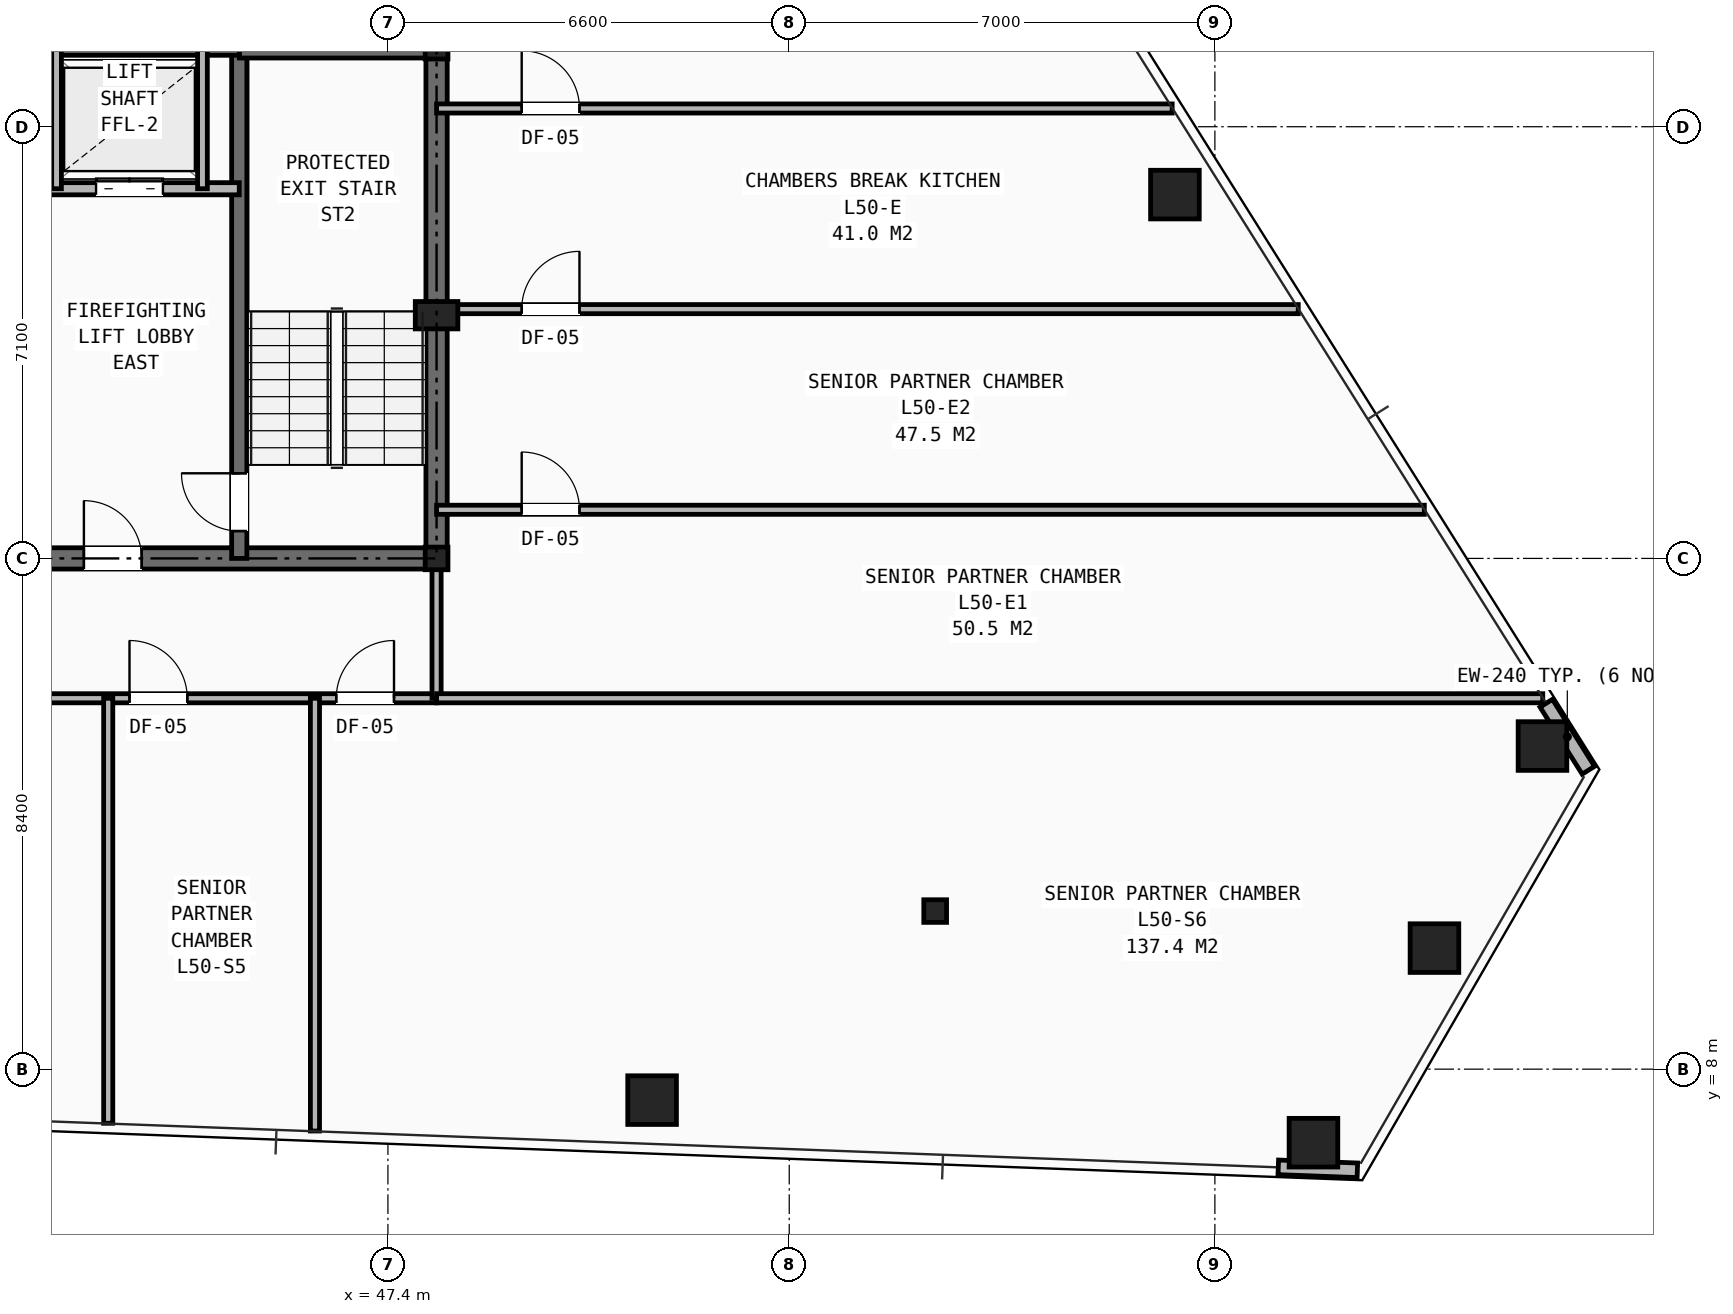
"""IFC4 building model, lengths in metres.
Left out: names, types, materials, properties, quantities, classifications, styles, units other than length and angle.
Written with IfcOpenShell. Run it as: python <this file> out.ifc"""

import sys

from ifc_helpers import new_model, si_unit, direction, frame, frame_2d, origin, origin_2d, place, context, subcontext, project, spatial, rectangle, hollow_rectangle, i_section, extrude, element, fill, save


model = new_model("IFC4")
c1 = context("Model", 3, precision=1e-05, world=origin(), true_north=direction((0.0, 1.0)))
c2 = subcontext(c1, "Body", "Model", "MODEL_VIEW")
j1 = project(units=[si_unit("LENGTHUNIT", "METRE"), si_unit("PLANEANGLEUNIT", "RADIAN")], contexts=[c1])
p1 = place(None, origin())
s1 = spatial("IfcSite", under=j1, at=p1, CompositionType="ELEMENT")
p2 = place(p1, origin())
s2 = spatial("IfcBuilding", under=s1, at=p2, CompositionType="ELEMENT")
p3 = place(p2, frame((0.0, 0.0, 175.8)))
s3 = spatial("IfcBuildingStorey", under=s2, at=p3, CompositionType="ELEMENT", Elevation=175.8)
for number, where, z_axis, x_axis in (
    (1, (48.2, 16.4, 0.0), (0.0, 0.0, 1.0), (1.0, 0.0, 0.0)),
    (2, (48.2, 24.8, 0.0), (0.0, 0.0, 1.0), (1.0, 0.0, 0.0)),
    (3, (56.4, 10.6, 0.0), (0.0, 0.0, 1.0), (1.0, 0.0, 0.0)),
):
    element("IfcColumn", number, at=place(p3, frame(where, z_axis=z_axis, x_axis=x_axis)), inside=s3, PredefinedType="COLUMN", context=c2, shape_type="SweptSolid", body=[
        extrude(i_section(OverallWidth=0.374, OverallDepth=0.372, WebThickness=0.016, FlangeThickness=0.026, at=origin_2d()), origin(), (0.0, 0.0, 1.0), 3.45),
    ])
p4 = place(p3, frame((48.2, 20.4, 0.0), z_axis=(0.0, 0.0, 1.0), x_axis=(1.0, 0.0, 0.0)))
e4 = element("IfcColumn", 4, at=p4, inside=s3, PredefinedType="PILASTER", context=c2, shape_type="SweptSolid", body=[
    extrude(rectangle(XDim=0.7, YDim=0.45, at=origin_2d()), origin(), (0.0, 0.0, 1.0), 3.45),
])
for number, where, z_axis, x_axis in (
    (5, (51.744, 7.491, 0.0), (0.0, 0.0, 1.0), (1.0, 0.0, 0.0)),
    (6, (62.621, 6.791, 0.0), (0.0, 0.0, 1.0), (1.0, 0.0, 0.0)),
    (7, (64.611, 9.991, 0.0), (0.0, 0.0, 1.0), (1.0, 0.0, 0.0)),
    (8, (66.388, 13.314, 0.0), (0.0, 0.0, 1.0), (1.0, 0.0, 0.0)),
    (9, (60.343, 22.384, 0.0), (0.0, 0.0, 1.0), (1.0, 0.0, 0.0)),
):
    element("IfcColumn", number, at=place(p3, frame(where, z_axis=z_axis, x_axis=x_axis)), inside=s3, PredefinedType="COLUMN", context=c2, shape_type="SweptSolid", body=[
        extrude(hollow_rectangle(XDim=0.8, YDim=0.8, WallThickness=0.055, at=origin_2d()), origin(), (0.0, 0.0, 1.0), 3.45),
    ])
for number, where, z_axis, x_axis in (
    (10, (62.042, 6.385, 0.0), (0.0, 0.0, 1.0), (0.999, -0.037, 0.0)),
    (11, (67.142, 12.916, 0.0), (0.0, 0.0, 1.0), (-0.532, 0.847, 0.0)),
):
    element("IfcWall", number, at=place(p3, frame(where, z_axis=z_axis, x_axis=x_axis)), inside=s3, PredefinedType="SHEAR", context=c2, shape_type="SweptSolid", body=[
        extrude(rectangle(XDim=1.302, YDim=0.24, at=frame_2d((0.651, 0.0))), origin(), (0.0, 0.0, 1.0), 2.583),
    ])
p5 = place(p3, frame((31.8, 16.4, 0.0), z_axis=(0.0, 0.0, 1.0), x_axis=(1.0, 0.0, 0.0)))
e12 = element("IfcWall", 12, at=p5, inside=s3, PredefinedType="SHEAR", context=c2, shape_type="SweptSolid", body=[
    extrude(rectangle(XDim=16.4, YDim=0.35, at=frame_2d((8.2, 0.0))), origin(), (0.0, 0.0, 1.0), 3.21),
])
p6 = place(p5, frame((7.75, 0.0, 0.0)))
e13 = element("IfcOpeningElement", 13, at=p6, cuts=e12, PredefinedType="OPENING", context=c2, shape_type="SweptSolid", body=[
    extrude(rectangle(XDim=0.9, YDim=2.1, at=frame_2d((0.45, 1.05))), frame((0.0, 0.185, 0.0), z_axis=(0.0, -1.0, 0.0), x_axis=(1.0, 0.0, 0.0)), (0.0, 0.0, 1.0), 0.37),
])
p7 = place(p5, frame((4.2, 0.0, 0.0)))
e14 = element("IfcOpeningElement", 14, at=p7, cuts=e12, PredefinedType="OPENING", context=c2, shape_type="SweptSolid", body=[
    extrude(rectangle(XDim=0.95, YDim=2.1, at=frame_2d((0.475, 1.05))), frame((0.0, 0.185, 0.0), z_axis=(0.0, -1.0, 0.0), x_axis=(1.0, 0.0, 0.0)), (0.0, 0.0, 1.0), 0.37),
])
p8 = place(p5, frame((10.6, 0.0, 0.0)))
e15 = element("IfcOpeningElement", 15, at=p8, cuts=e12, PredefinedType="OPENING", context=c2, shape_type="SweptSolid", body=[
    extrude(rectangle(XDim=0.95, YDim=2.1, at=frame_2d((0.475, 1.05))), frame((0.0, 0.185, 0.0), z_axis=(0.0, -1.0, 0.0), x_axis=(1.0, 0.0, 0.0)), (0.0, 0.0, 1.0), 0.37),
])
p9 = place(p3, frame((48.2, 16.4, 0.0), z_axis=(0.0, 0.0, 1.0), x_axis=(0.0, 1.0, 0.0)))
e16 = element("IfcWall", 16, at=p9, inside=s3, PredefinedType="SHEAR", context=c2, shape_type="SweptSolid", body=[
    extrude(rectangle(XDim=14.8, YDim=0.35, at=frame_2d((7.4, 0.0))), origin(), (0.0, 0.0, 1.0), 3.21),
])
p10 = place(p9, frame((11.0, 0.0, 0.0)))
e17 = element("IfcOpeningElement", 17, at=p10, cuts=e16, PredefinedType="OPENING", context=c2, shape_type="SweptSolid", body=[
    extrude(rectangle(XDim=1.1, YDim=2.15, at=frame_2d((0.55, 1.075))), frame((0.0, 0.185, 0.0), z_axis=(0.0, -1.0, 0.0), x_axis=(1.0, 0.0, 0.0)), (0.0, 0.0, 1.0), 0.37),
])
p11 = place(p3, frame((44.955, 16.4, 0.0), z_axis=(0.0, 0.0, 1.0), x_axis=(0.0, 1.0, 0.0)))
e18 = element("IfcWall", 18, at=p11, inside=s3, PredefinedType="SHEAR", context=c2, shape_type="SweptSolid", body=[
    extrude(rectangle(XDim=8.4, YDim=0.25, at=frame_2d((4.2, 0.0))), origin(), (0.0, 0.0, 1.0), 3.21),
])
p12 = place(p11, frame((0.45, 0.0, 0.0)))
e19 = element("IfcOpeningElement", 19, at=p12, cuts=e18, PredefinedType="OPENING", context=c2, shape_type="SweptSolid", body=[
    extrude(rectangle(XDim=0.95, YDim=2.1, at=frame_2d((0.475, 1.05))), frame((0.0, 0.135, 0.0), z_axis=(0.0, -1.0, 0.0), x_axis=(1.0, 0.0, 0.0)), (0.0, 0.0, 1.0), 0.27),
])
p13 = place(p3, frame((44.955, 24.755, 0.0), z_axis=(0.0, 0.0, 1.0), x_axis=(1.0, 0.0, 0.0)))
e20 = element("IfcWall", 20, at=p13, inside=s3, PredefinedType="SHEAR", context=c2, shape_type="SweptSolid", body=[
    extrude(rectangle(XDim=3.245, YDim=0.25, at=frame_2d((1.623, 0.0))), origin(), (0.0, 0.0, 1.0), 3.21),
])
p14 = place(p3, frame((35.045, 24.8, 0.0), z_axis=(0.0, 0.0, 1.0), x_axis=(1.0, 0.0, 0.0)))
e21 = element("IfcWall", 21, at=p14, inside=s3, PredefinedType="SHEAR", context=c2, shape_type="SweptSolid", body=[
    extrude(rectangle(XDim=9.91, YDim=0.25, at=frame_2d((4.955, 0.0))), origin(), (0.0, 0.0, 1.0), 3.21),
])
p15 = place(p3, frame((35.045, 22.48, 0.0), z_axis=(0.0, 0.0, 1.0), x_axis=(1.0, 0.0, 0.0)))
e22 = element("IfcWall", 22, at=p15, inside=s3, PredefinedType="SOLIDWALL", context=c2, shape_type="SweptSolid", body=[
    extrude(rectangle(XDim=9.91, YDim=0.2, at=frame_2d((4.955, 0.0))), origin(), (0.0, 0.0, 1.0), 3.21),
])
p16 = place(p15, frame((1.255, 0.0, 0.0)))
e23 = element("IfcOpeningElement", 23, at=p16, cuts=e22, PredefinedType="OPENING", context=c2, shape_type="SweptSolid", body=[
    extrude(rectangle(XDim=1.1, YDim=2.15, at=frame_2d((0.55, 1.075))), frame((0.0, 0.11, 0.0), z_axis=(0.0, -1.0, 0.0), x_axis=(1.0, 0.0, 0.0)), (0.0, 0.0, 1.0), 0.22),
])
p17 = place(p15, frame((7.555, 0.0, 0.0)))
e24 = element("IfcOpeningElement", 24, at=p17, cuts=e22, PredefinedType="OPENING", context=c2, shape_type="SweptSolid", body=[
    extrude(rectangle(XDim=1.1, YDim=2.15, at=frame_2d((0.55, 1.075))), frame((0.0, 0.11, 0.0), z_axis=(0.0, -1.0, 0.0), x_axis=(1.0, 0.0, 0.0)), (0.0, 0.0, 1.0), 0.22),
])
p18 = place(p15, frame((4.405, 0.0, 0.0)))
e25 = element("IfcOpeningElement", 25, at=p18, cuts=e22, PredefinedType="OPENING", context=c2, shape_type="SweptSolid", body=[
    extrude(rectangle(XDim=1.1, YDim=2.15, at=frame_2d((0.55, 1.075))), frame((0.0, 0.11, 0.0), z_axis=(0.0, -1.0, 0.0), x_axis=(1.0, 0.0, 0.0)), (0.0, 0.0, 1.0), 0.22),
])
for number, where, z_axis, x_axis in (
    (26, (41.95, 22.48, 0.0), (0.0, 0.0, 1.0), (0.0, 1.0, 0.0)),
    (27, (44.35, 22.48, 0.0), (0.0, 0.0, 1.0), (0.0, 1.0, 0.0)),
):
    element("IfcWall", number, at=place(p3, frame(where, z_axis=z_axis, x_axis=x_axis)), inside=s3, PredefinedType="SOLIDWALL", context=c2, shape_type="SweptSolid", body=[
        extrude(rectangle(XDim=2.32, YDim=0.16, at=frame_2d((1.16, 0.0))), origin(), (0.0, 0.0, 1.0), 3.21),
    ])
p19 = place(p3, frame((29.6, 14.1, 0.0), z_axis=(0.0, 0.0, 1.0), x_axis=(1.0, 0.0, 0.0)))
e28 = element("IfcWall", 28, at=p19, inside=s3, PredefinedType="PARTITIONING", context=c2, shape_type="SweptSolid", body=[
    extrude(rectangle(XDim=18.6, YDim=0.15, at=frame_2d((9.3, 0.0))), origin(), (0.0, 0.0, 1.0), 2.252),
])
p20 = place(p19, frame((0.55, 0.0, 0.0)))
e29 = element("IfcOpeningElement", 29, at=p20, cuts=e28, PredefinedType="OPENING", context=c2, shape_type="SweptSolid", body=[
    extrude(rectangle(XDim=0.95, YDim=2.1, at=frame_2d((0.475, 1.05))), frame((0.0, 0.085, 0.0), z_axis=(0.0, -1.0, 0.0), x_axis=(1.0, 0.0, 0.0)), (0.0, 0.0, 1.0), 0.17),
])
p21 = place(p19, frame((2.25, 0.0, 0.0)))
e30 = element("IfcOpeningElement", 30, at=p21, cuts=e28, PredefinedType="OPENING", context=c2, shape_type="SweptSolid", body=[
    extrude(rectangle(XDim=0.95, YDim=2.1, at=frame_2d((0.475, 1.05))), frame((0.0, 0.085, 0.0), z_axis=(0.0, -1.0, 0.0), x_axis=(1.0, 0.0, 0.0)), (0.0, 0.0, 1.0), 0.17),
])
p22 = place(p19, frame((5.95, 0.0, 0.0)))
e31 = element("IfcOpeningElement", 31, at=p22, cuts=e28, PredefinedType="OPENING", context=c2, shape_type="SweptSolid", body=[
    extrude(rectangle(XDim=0.95, YDim=2.1, at=frame_2d((0.475, 1.05))), frame((0.0, 0.085, 0.0), z_axis=(0.0, -1.0, 0.0), x_axis=(1.0, 0.0, 0.0)), (0.0, 0.0, 1.0), 0.17),
])
p23 = place(p19, frame((9.75, 0.0, 0.0)))
e32 = element("IfcOpeningElement", 32, at=p23, cuts=e28, PredefinedType="OPENING", context=c2, shape_type="SweptSolid", body=[
    extrude(rectangle(XDim=0.95, YDim=2.1, at=frame_2d((0.475, 1.05))), frame((0.0, 0.085, 0.0), z_axis=(0.0, -1.0, 0.0), x_axis=(1.0, 0.0, 0.0)), (0.0, 0.0, 1.0), 0.17),
])
p24 = place(p19, frame((13.55, 0.0, 0.0)))
e33 = element("IfcOpeningElement", 33, at=p24, cuts=e28, PredefinedType="OPENING", context=c2, shape_type="SweptSolid", body=[
    extrude(rectangle(XDim=0.95, YDim=2.1, at=frame_2d((0.475, 1.05))), frame((0.0, 0.085, 0.0), z_axis=(0.0, -1.0, 0.0), x_axis=(1.0, 0.0, 0.0)), (0.0, 0.0, 1.0), 0.17),
])
p25 = place(p19, frame((16.95, 0.0, 0.0)))
e34 = element("IfcOpeningElement", 34, at=p25, cuts=e28, PredefinedType="OPENING", context=c2, shape_type="SweptSolid", body=[
    extrude(rectangle(XDim=0.95, YDim=2.1, at=frame_2d((0.475, 1.05))), frame((0.0, 0.085, 0.0), z_axis=(0.0, -1.0, 0.0), x_axis=(1.0, 0.0, 0.0)), (0.0, 0.0, 1.0), 0.17),
])
p26 = place(p3, frame((48.2, 14.1, 0.0), z_axis=(0.0, 0.0, 1.0), x_axis=(0.0, 1.0, 0.0)))
e35 = element("IfcWall", 35, at=p26, inside=s3, PredefinedType="PARTITIONING", context=c2, shape_type="SweptSolid", body=[
    extrude(rectangle(XDim=2.3, YDim=0.15, at=frame_2d((1.15, 0.0))), origin(), (0.0, 0.0, 1.0), 2.665),
])
p27 = place(p3, frame((42.8, 7.11, 0.0), z_axis=(0.0, 0.0, 1.0), x_axis=(0.0, 1.0, 0.0)))
e36 = element("IfcWall", 36, at=p27, inside=s3, PredefinedType="PARTITIONING", context=c2, shape_type="SweptSolid", body=[
    extrude(rectangle(XDim=6.99, YDim=0.15, at=frame_2d((3.495, 0.0))), origin(), (0.0, 0.0, 1.0), 2.589),
])
p28 = place(p3, frame((46.2, 6.983, 0.0), z_axis=(0.0, 0.0, 1.0), x_axis=(0.0, 1.0, 0.0)))
e37 = element("IfcWall", 37, at=p28, inside=s3, PredefinedType="PARTITIONING", context=c2, shape_type="SweptSolid", body=[
    extrude(rectangle(XDim=7.117, YDim=0.15, at=frame_2d((3.559, 0.0))), origin(), (0.0, 0.0, 1.0), 2.589),
])
p29 = place(p3, frame((48.2, 14.1, 0.0), z_axis=(0.0, 0.0, 1.0), x_axis=(1.0, 0.0, 0.0)))
e38 = element("IfcWall", 38, at=p29, inside=s3, PredefinedType="PARTITIONING", context=c2, shape_type="SweptSolid", body=[
    extrude(rectangle(XDim=18.192, YDim=0.15, at=frame_2d((9.096, 0.0))), origin(), (0.0, 0.0, 1.0), 2.589),
])
p30 = place(p3, frame((48.2, 17.2, 0.0), z_axis=(0.0, 0.0, 1.0), x_axis=(1.0, 0.0, 0.0)))
e39 = element("IfcWall", 39, at=p30, inside=s3, PredefinedType="PARTITIONING", context=c2, shape_type="SweptSolid", body=[
    extrude(rectangle(XDim=16.244, YDim=0.15, at=frame_2d((8.122, 0.0))), origin(), (0.0, 0.0, 1.0), 2.589),
])
p31 = place(p30, frame((1.4, 0.0, 0.0)))
e40 = element("IfcOpeningElement", 40, at=p31, cuts=e39, PredefinedType="OPENING", context=c2, shape_type="SweptSolid", body=[
    extrude(rectangle(XDim=0.95, YDim=2.1, at=frame_2d((0.475, 1.05))), frame((0.0, 0.085, 0.0), z_axis=(0.0, -1.0, 0.0), x_axis=(1.0, 0.0, 0.0)), (0.0, 0.0, 1.0), 0.17),
])
p32 = place(p3, frame((48.2, 20.5, 0.0), z_axis=(0.0, 0.0, 1.0), x_axis=(1.0, 0.0, 0.0)))
e41 = element("IfcWall", 41, at=p32, inside=s3, PredefinedType="PARTITIONING", context=c2, shape_type="SweptSolid", body=[
    extrude(rectangle(XDim=14.171, YDim=0.15, at=frame_2d((7.085, 0.0))), origin(), (0.0, 0.0, 1.0), 2.589),
])
p33 = place(p32, frame((1.4, 0.0, 0.0)))
e42 = element("IfcOpeningElement", 42, at=p33, cuts=e41, PredefinedType="OPENING", context=c2, shape_type="SweptSolid", body=[
    extrude(rectangle(XDim=0.95, YDim=2.1, at=frame_2d((0.475, 1.05))), frame((0.0, 0.085, 0.0), z_axis=(0.0, -1.0, 0.0), x_axis=(1.0, 0.0, 0.0)), (0.0, 0.0, 1.0), 0.17),
])
p34 = place(p3, frame((48.2, 23.8, 0.0), z_axis=(0.0, 0.0, 1.0), x_axis=(1.0, 0.0, 0.0)))
e43 = element("IfcWall", 43, at=p34, inside=s3, PredefinedType="PARTITIONING", context=c2, shape_type="SweptSolid", body=[
    extrude(rectangle(XDim=12.097, YDim=0.15, at=frame_2d((6.049, 0.0))), origin(), (0.0, 0.0, 1.0), 2.589),
])
p35 = place(p34, frame((1.4, 0.0, 0.0)))
e44 = element("IfcOpeningElement", 44, at=p35, cuts=e43, PredefinedType="OPENING", context=c2, shape_type="SweptSolid", body=[
    extrude(rectangle(XDim=0.95, YDim=2.1, at=frame_2d((0.475, 1.05))), frame((0.0, 0.085, 0.0), z_axis=(0.0, -1.0, 0.0), x_axis=(1.0, 0.0, 0.0)), (0.0, 0.0, 1.0), 0.17),
])
p36 = place(p12, origin())
e45 = element("IfcDoor", 45, at=p36, inside=s3, OperationType="SINGLE_SWING_RIGHT", PredefinedType="DOOR", context=c2, shape_type="SweptSolid", body=[
    extrude(rectangle(XDim=0.95, YDim=2.1, at=frame_2d((0.475, 1.05))), frame((0.0, 0.025, 0.0), z_axis=(0.0, -1.0, 0.0), x_axis=(1.0, 0.0, 0.0)), (0.0, 0.0, 1.0), 0.05),
])
fill(e19, e45)
p37 = place(p8, origin())
e46 = element("IfcDoor", 46, at=p37, inside=s3, OperationType="SINGLE_SWING_LEFT", PredefinedType="DOOR", context=c2, shape_type="SweptSolid", body=[
    extrude(rectangle(XDim=0.95, YDim=2.1, at=frame_2d((0.475, 1.05))), frame((0.0, 0.025, 0.0), z_axis=(0.0, -1.0, 0.0), x_axis=(1.0, 0.0, 0.0)), (0.0, 0.0, 1.0), 0.05),
])
fill(e15, e46)
p38 = place(p17, origin())
e47 = element("IfcDoor", 47, at=p38, inside=s3, OperationType="DOUBLE_DOOR_SLIDING", PredefinedType="DOOR", context=c2, shape_type="SweptSolid", body=[
    extrude(rectangle(XDim=1.1, YDim=2.15, at=frame_2d((0.55, 1.075))), frame((0.0, 0.025, 0.0), z_axis=(0.0, -1.0, 0.0), x_axis=(1.0, 0.0, 0.0)), (0.0, 0.0, 1.0), 0.05),
])
fill(e24, e47)
p39 = place(p24, origin())
e48 = element("IfcDoor", 48, at=p39, inside=s3, OperationType="SINGLE_SWING_LEFT", PredefinedType="DOOR", context=c2, shape_type="SweptSolid", body=[
    extrude(rectangle(XDim=0.95, YDim=2.1, at=frame_2d((0.475, 1.05))), frame((0.0, 0.025, 0.0), z_axis=(0.0, -1.0, 0.0), x_axis=(1.0, 0.0, 0.0)), (0.0, 0.0, 1.0), 0.05),
])
fill(e33, e48)
p40 = place(p25, origin())
e49 = element("IfcDoor", 49, at=p40, inside=s3, OperationType="SINGLE_SWING_RIGHT", PredefinedType="DOOR", context=c2, shape_type="SweptSolid", body=[
    extrude(rectangle(XDim=0.95, YDim=2.1, at=frame_2d((0.475, 1.05))), frame((0.0, 0.025, 0.0), z_axis=(0.0, -1.0, 0.0), x_axis=(1.0, 0.0, 0.0)), (0.0, 0.0, 1.0), 0.05),
])
fill(e34, e49)
p41 = place(p31, origin())
e50 = element("IfcDoor", 50, at=p41, inside=s3, OperationType="SINGLE_SWING_LEFT", PredefinedType="DOOR", context=c2, shape_type="SweptSolid", body=[
    extrude(rectangle(XDim=0.95, YDim=2.1, at=frame_2d((0.475, 1.05))), frame((0.0, 0.025, 0.0), z_axis=(0.0, -1.0, 0.0), x_axis=(1.0, 0.0, 0.0)), (0.0, 0.0, 1.0), 0.05),
])
fill(e40, e50)
p42 = place(p33, origin())
e51 = element("IfcDoor", 51, at=p42, inside=s3, OperationType="SINGLE_SWING_RIGHT", PredefinedType="DOOR", context=c2, shape_type="SweptSolid", body=[
    extrude(rectangle(XDim=0.95, YDim=2.1, at=frame_2d((0.475, 1.05))), frame((0.0, 0.025, 0.0), z_axis=(0.0, -1.0, 0.0), x_axis=(1.0, 0.0, 0.0)), (0.0, 0.0, 1.0), 0.05),
])
fill(e42, e51)
p43 = place(p35, origin())
e52 = element("IfcDoor", 52, at=p43, inside=s3, OperationType="SINGLE_SWING_LEFT", PredefinedType="DOOR", context=c2, shape_type="SweptSolid", body=[
    extrude(rectangle(XDim=0.95, YDim=2.1, at=frame_2d((0.475, 1.05))), frame((0.0, 0.025, 0.0), z_axis=(0.0, -1.0, 0.0), x_axis=(1.0, 0.0, 0.0)), (0.0, 0.0, 1.0), 0.05),
])
fill(e44, e52)
save(model, sys.argv[1])
